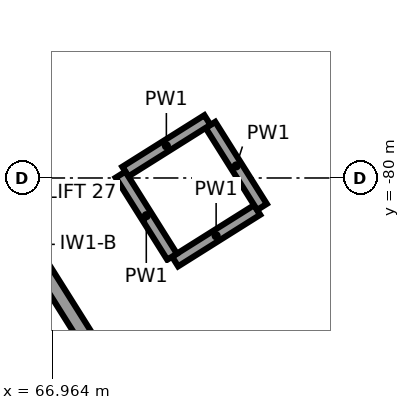
"""IFC4 building model, lengths in metres.
Left out: names, types, materials, properties, quantities, classifications, styles, units other than length and angle.
Written with IfcOpenShell. Run it as: python <this file> out.ifc"""

import sys

from ifc_helpers import new_model, si_unit, direction, frame, frame_2d, origin, place, context, subcontext, project, spatial, rectangle, extrude, element, save


model = new_model("IFC4")
c1 = context("Model", 3, precision=1e-05, world=origin(), true_north=direction((0.0, 1.0)))
c2 = subcontext(c1, "Body", "Model", "MODEL_VIEW")
j1 = project(units=[si_unit("LENGTHUNIT", "METRE"), si_unit("PLANEANGLEUNIT", "RADIAN")], contexts=[c1])
p1 = place(None, origin())
s1 = spatial("IfcSite", under=j1, at=p1, CompositionType="ELEMENT")
p2 = place(p1, origin())
s2 = spatial("IfcBuilding", under=s1, at=p2, CompositionType="ELEMENT")
p3 = place(p2, frame((0.0, 0.0, 18.0)))
s3 = spatial("IfcBuildingStorey", under=s2, at=p3, CompositionType="ELEMENT", Elevation=18.0)
p4 = place(p3, frame((67.437, -82.143, 0.0), z_axis=(0.0, 0.0, 1.0), x_axis=(-0.532038212918, 0.84672034344, 0.0)))
e1 = element("IfcWall", 1, at=p4, inside=s3, PredefinedType="SHEAR", context=c2, shape_type="SweptSolid", body=[
    extrude(rectangle(XDim=3.0, YDim=0.2, at=frame_2d((1.5, 0.0))), origin(), (0.0, 0.0, 1.0), 4.6),
])
for number, where, z_axis, x_axis in (
    (2, (68.582, -81.099, 0.0), (0.0, 0.0, 1.0), (0.847, 0.532, 0.0)),
    (3, (69.725, -80.381, 0.0), (0.0, 0.0, 1.0), (-0.532, 0.847, 0.0)),
):
    element("IfcWall", number, at=place(p3, frame(where, z_axis=z_axis, x_axis=x_axis)), inside=s3, PredefinedType="PARTITIONING", context=c2, shape_type="SweptSolid", body=[
        extrude(rectangle(XDim=1.275, YDim=0.15, at=frame_2d((0.638, 0.0))), origin(), (0.0, 0.0, 1.0), 5.6),
    ])
for number, where, z_axis, x_axis in (
    (4, (69.007, -79.238, 0.0), (0.0, 0.0, 1.0), (-0.847, -0.532, 0.0)),
    (5, (67.864, -79.956, 0.0), (0.0, 0.0, 1.0), (0.532, -0.847, 0.0)),
):
    element("IfcWall", number, at=place(p3, frame(where, z_axis=z_axis, x_axis=x_axis)), inside=s3, PredefinedType="PARTITIONING", context=c2, shape_type="SweptSolid", body=[
        extrude(rectangle(XDim=1.275, YDim=0.15, at=frame_2d((0.637, 0.0))), origin(), (0.0, 0.0, 1.0), 5.6),
    ])
p5 = place(p3, frame((72.143, -78.552, 0.0), z_axis=(0.0, 0.0, 1.0), x_axis=(-0.53204233593, 0.846717752724, 0.0)))
e6 = element("IfcWall", 6, at=p5, inside=s3, PredefinedType="PARTITIONING", context=c2, shape_type="SweptSolid", body=[
    extrude(rectangle(XDim=5.108, YDim=0.15, at=frame_2d((2.554, 0.0))), origin(), (0.0, 0.0, 1.0), 4.5),
])
p6 = place(p5, frame((0.05, 0.0, 0.0)))
e7 = element("IfcOpeningElement", 7, at=p6, cuts=e6, PredefinedType="OPENING", context=c2, shape_type="SweptSolid", body=[
    extrude(rectangle(XDim=1.8, YDim=2.1, at=frame_2d((0.9, 1.05))), frame((0.0, 0.085, 0.0), z_axis=(0.0, -1.0, 0.0), x_axis=(1.0, 0.0, 0.0)), (0.0, 0.0, 1.0), 0.17),
])
p7 = place(p3, frame((69.425, -74.227, 0.0), z_axis=(0.0, 0.0, 1.0), x_axis=(-0.84672500752, -0.532030790124, 0.0)))
e8 = element("IfcWall", 8, at=p7, inside=s3, PredefinedType="PARTITIONING", context=c2, shape_type="SweptSolid", body=[
    extrude(rectangle(XDim=13.89, YDim=0.15, at=frame_2d((6.945, 0.0))), origin(), (0.0, 0.0, 1.0), 4.894),
])
p8 = place(p7, frame((6.75, 0.0, 0.0)))
e9 = element("IfcOpeningElement", 9, at=p8, cuts=e8, PredefinedType="OPENING", context=c2, shape_type="SweptSolid", body=[
    extrude(rectangle(XDim=1.8, YDim=2.1, at=frame_2d((0.9, 1.05))), frame((0.0, 0.085, 0.0), z_axis=(0.0, -1.0, 0.0), x_axis=(1.0, 0.0, 0.0)), (0.0, 0.0, 1.0), 0.17),
])
save(model, sys.argv[1])
